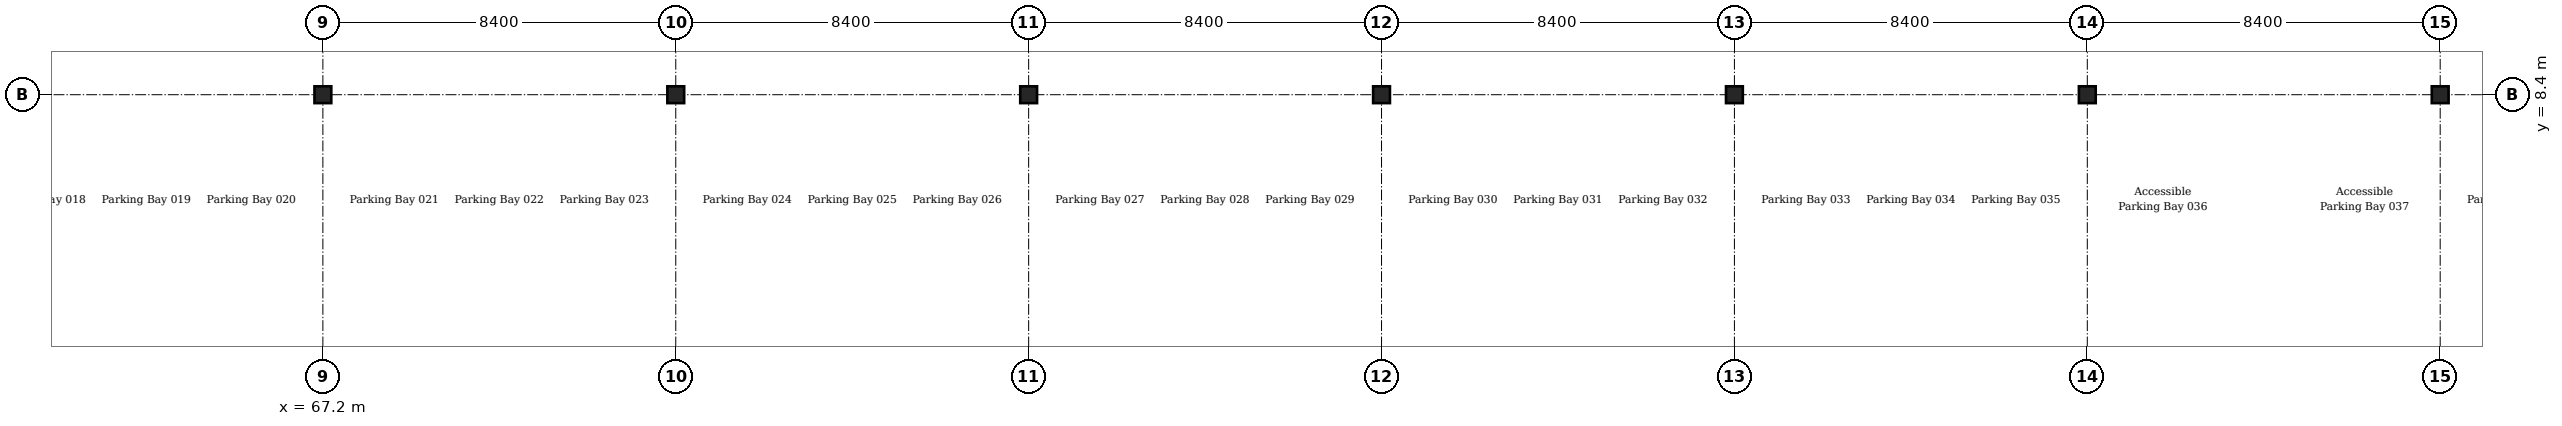
"""IFC4 building model, lengths in metres.
Left out: names, types, materials, properties, quantities, classifications, styles, units other than length and angle.
Written with IfcOpenShell. Run it as: python <this file> out.ifc"""

import sys

from ifc_helpers import new_model, si_unit, direction, frame, origin, origin_2d, place, context, subcontext, project, spatial, i_section, extrude, element, save


model = new_model("IFC4")
c1 = context("Model", 3, precision=1e-05, world=origin(), true_north=direction((0.0, 1.0)))
c2 = subcontext(c1, "Body", "Model", "MODEL_VIEW")
j1 = project(units=[si_unit("LENGTHUNIT", "METRE"), si_unit("PLANEANGLEUNIT", "RADIAN")], contexts=[c1])
p1 = place(None, origin())
s1 = spatial("IfcSite", under=j1, at=p1, CompositionType="ELEMENT")
p2 = place(p1, origin())
s2 = spatial("IfcBuilding", under=s1, at=p2, CompositionType="ELEMENT")
p3 = place(p2, frame((0.0, 0.0, -5.4)))
s3 = spatial("IfcBuildingStorey", under=s2, at=p3, CompositionType="ELEMENT", Elevation=-5.4)
for number, where, z_axis, x_axis in (
    (1, (67.2, 8.4, 0.0), (0.0, 0.0, 1.0), (1.0, 0.0, 0.0)),
    (2, (75.6, 8.4, 0.0), (0.0, 0.0, 1.0), (1.0, 0.0, 0.0)),
    (3, (84.0, 8.4, 0.0), (0.0, 0.0, 1.0), (1.0, 0.0, 0.0)),
    (4, (92.4, 8.4, 0.0), (0.0, 0.0, 1.0), (1.0, 0.0, 0.0)),
    (5, (100.8, 8.4, 0.0), (0.0, 0.0, 1.0), (1.0, 0.0, 0.0)),
    (6, (109.2, 8.4, 0.0), (0.0, 0.0, 1.0), (1.0, 0.0, 0.0)),
    (7, (117.6, 8.4, 0.0), (0.0, 0.0, 1.0), (1.0, 0.0, 0.0)),
):
    element("IfcColumn", number, at=place(p3, frame(where, z_axis=z_axis, x_axis=x_axis)), inside=s3, PredefinedType="COLUMN", context=c2, shape_type="SweptSolid", body=[
        extrude(i_section(OverallWidth=0.4, OverallDepth=0.4, WebThickness=0.013, FlangeThickness=0.021, FilletRadius=0.022, at=origin_2d()), origin(), (0.0, 0.0, 1.0), 5.4),
    ])
save(model, sys.argv[1])
